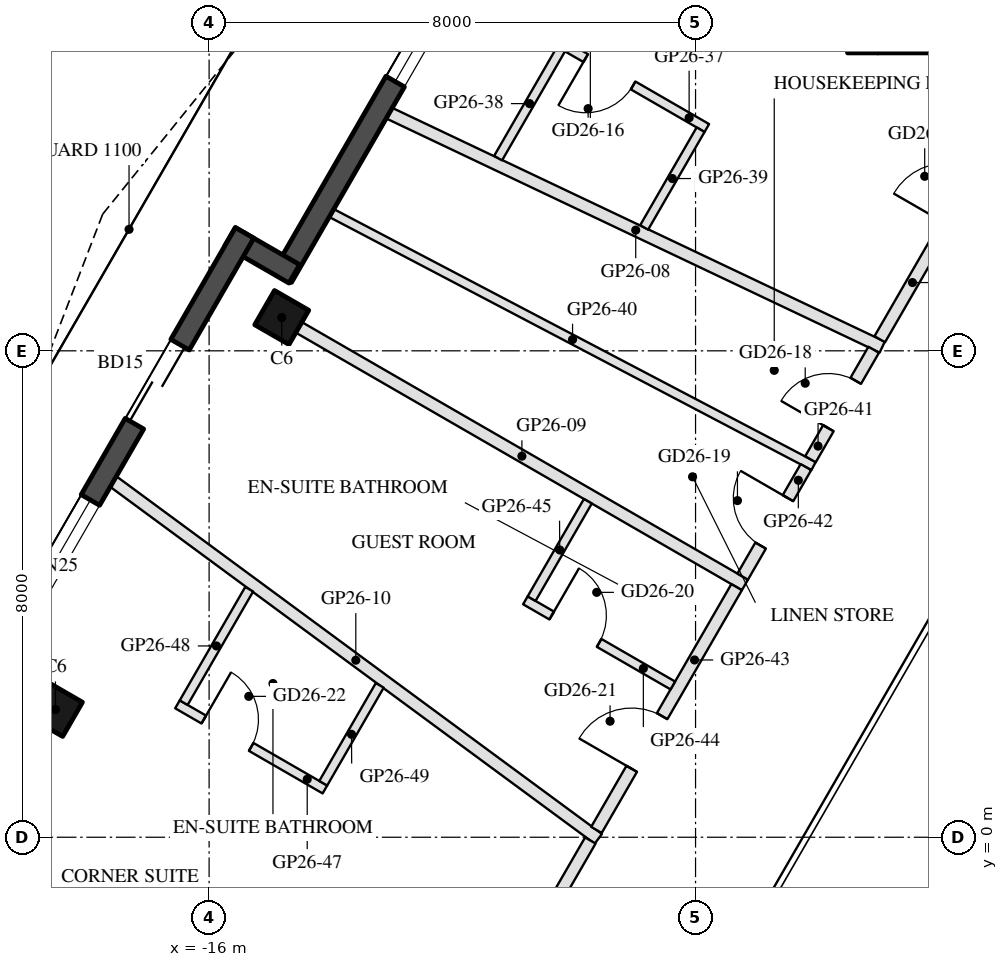
"""IFC4 building model, lengths in metres.
Left out: names, types, materials, properties, quantities, classifications, styles, units other than length and angle.
Written with IfcOpenShell. Run it as: python <this file> out.ifc"""

import sys

from ifc_helpers import new_model, si_unit, direction, frame, frame_2d, origin, origin_2d, place, context, subcontext, project, spatial, rectangle, hollow_rectangle, extrude, boolean, halfspace, element, fill, save


model = new_model("IFC4")
c1 = context("Model", 3, precision=1e-05, world=origin(), true_north=direction((0.0, 1.0)))
c2 = subcontext(c1, "Body", "Model", "MODEL_VIEW")
j1 = project(units=[si_unit("LENGTHUNIT", "METRE"), si_unit("PLANEANGLEUNIT", "RADIAN")], contexts=[c1])
p1 = place(None, origin())
s1 = spatial("IfcSite", under=j1, at=p1, CompositionType="ELEMENT")
p2 = place(p1, origin())
s2 = spatial("IfcBuilding", under=s1, at=p2, CompositionType="ELEMENT")
p3 = place(p2, frame((0.0, 0.0, 272.6)))
s3 = spatial("IfcBuildingStorey", under=s2, at=p3, CompositionType="ELEMENT", Elevation=272.6)
p4 = place(p3, frame((-14.805, 8.548, 0.0), z_axis=(0.0, 0.0, 1.0), x_axis=(0.5, 0.866025403784, 0.0)))
e1 = element("IfcColumn", 1, at=p4, inside=s3, PredefinedType="COLUMN", context=c2, shape_type="SweptSolid", body=[
    boolean("DIFFERENCE", extrude(hollow_rectangle(XDim=0.65, YDim=0.65, WallThickness=0.03, at=origin_2d()), origin(), (0.0, 0.0, 1.0), 3.7), halfspace(frame((0.0, 0.0, 3.663), z_axis=(0.0, 0.0, 1.0), x_axis=(1.0, 0.0, 0.0)), False)),
])
p5 = place(p3, frame((-18.527, 2.102, 0.0), z_axis=(0.0, 0.0, 1.0), x_axis=(0.5, 0.866025403784, 0.0)))
e2 = element("IfcColumn", 2, at=p5, inside=s3, PredefinedType="COLUMN", context=c2, shape_type="SweptSolid", body=[
    boolean("DIFFERENCE", extrude(hollow_rectangle(XDim=0.65, YDim=0.65, WallThickness=0.03, at=origin_2d()), origin(), (0.0, 0.0, 1.0), 3.7), halfspace(frame((0.0, 0.0, 3.66), z_axis=(0.0, 0.0, 1.0), x_axis=(1.0, 0.0, 0.0)), False)),
])
p6 = place(p3, frame((-11.655, 14.655, 0.0), z_axis=(0.0, 0.0, 1.0), x_axis=(-0.499995993298, -0.866027717042, 0.0)))
e3 = element("IfcWall", 3, at=p6, inside=s3, PredefinedType="SOLIDWALL", context=c2, shape_type="SweptSolid", body=[
    extrude(rectangle(XDim=6.284, YDim=0.35, at=frame_2d((3.142, 0.0))), origin(), (0.0, 0.0, 1.0), 3.55),
])
p7 = place(p6, frame((0.77, 0.0, 0.3)))
e4 = element("IfcOpeningElement", 4, at=p7, cuts=e3, PredefinedType="OPENING", context=c2, shape_type="SweptSolid", body=[
    extrude(rectangle(XDim=1.8, YDim=2.65, at=frame_2d((0.9, 1.325))), frame((0.0, 0.185, 0.0), z_axis=(0.0, -1.0, 0.0), x_axis=(1.0, 0.0, 0.0)), (0.0, 0.0, 1.0), 0.37),
])
p8 = place(p3, frame((-14.599, 9.266, 0.0), z_axis=(0.0, 0.0, 1.0), x_axis=(-0.866005645448, 0.500034220881, 0.0)))
e5 = element("IfcWall", 5, at=p8, inside=s3, PredefinedType="SOLIDWALL", context=c2, shape_type="SweptSolid", body=[
    extrude(rectangle(XDim=1.22, YDim=0.35, at=frame_2d((0.61, 0.0))), origin(), (0.0, 0.0, 1.0), 3.55),
])
p9 = place(p3, frame((-15.416, 9.94, 0.0), z_axis=(0.0, 0.0, 1.0), x_axis=(-0.500005190411, -0.866022407078, 0.0)))
e6 = element("IfcWall", 6, at=p9, inside=s3, PredefinedType="SOLIDWALL", context=c2, shape_type="SweptSolid", body=[
    extrude(rectangle(XDim=9.244, YDim=0.35, at=frame_2d((4.622, 0.0))), origin(), (0.0, 0.0, 1.0), 3.55),
])
p10 = place(p9, frame((2.124, 0.0, 0.0)))
e7 = element("IfcOpeningElement", 7, at=p10, cuts=e6, PredefinedType="OPENING", context=c2, shape_type="SweptSolid", body=[
    extrude(rectangle(XDim=1.5, YDim=2.4, at=frame_2d((0.75, 1.2))), frame((0.0, 0.185, 0.0), z_axis=(0.0, -1.0, 0.0), x_axis=(1.0, 0.0, 0.0)), (0.0, 0.0, 1.0), 0.37),
])
p11 = place(p9, frame((5.072, 0.0, 0.3)))
e8 = element("IfcOpeningElement", 8, at=p11, cuts=e6, PredefinedType="OPENING", context=c2, shape_type="SweptSolid", body=[
    extrude(rectangle(XDim=2.5, YDim=2.65, at=frame_2d((1.25, 1.325))), frame((0.0, 0.185, 0.0), z_axis=(0.0, -1.0, 0.0), x_axis=(1.0, 0.0, 0.0)), (0.0, 0.0, 1.0), 0.37),
])
p12 = place(p3, frame((-5.25, 12.9, 0.0), z_axis=(0.0, 0.0, 1.0), x_axis=(0.0, 1.0, 0.0)))
e9 = element("IfcWall", 9, at=p12, inside=s3, PredefinedType="SHEAR", context=c2, shape_type="SweptSolid", body=[
    extrude(rectangle(XDim=13.031, YDim=0.5, at=frame_2d((6.516, 0.0))), origin(), (0.0, 0.0, 1.0), 3.5),
])
p13 = place(p3, frame((5.0, 13.1, 0.0), z_axis=(0.0, 0.0, 1.0), x_axis=(-1.0, 0.0, 0.0)))
e10 = element("IfcWall", 10, at=p13, inside=s3, PredefinedType="SHEAR", context=c2, shape_type="SweptSolid", body=[
    extrude(rectangle(XDim=10.0, YDim=0.4, at=frame_2d((5.0, 0.0))), origin(), (0.0, 0.0, 1.0), 3.5),
])
p14 = place(p13, frame((3.55, 0.0, 0.0)))
e11 = element("IfcOpeningElement", 11, at=p14, cuts=e10, PredefinedType="OPENING", context=c2, shape_type="SweptSolid", body=[
    extrude(rectangle(XDim=1.1, YDim=2.1, at=frame_2d((0.55, 1.05))), frame((0.0, 0.21, 0.0), z_axis=(0.0, -1.0, 0.0), x_axis=(1.0, 0.0, 0.0)), (0.0, 0.0, 1.0), 0.42),
])
p15 = place(p13, frame((5.85, 0.0, 0.0)))
e12 = element("IfcOpeningElement", 12, at=p15, cuts=e10, PredefinedType="OPENING", context=c2, shape_type="SweptSolid", body=[
    extrude(rectangle(XDim=1.4, YDim=2.1, at=frame_2d((0.7, 1.05))), frame((0.0, 0.21, 0.0), z_axis=(0.0, -1.0, 0.0), x_axis=(1.0, 0.0, 0.0)), (0.0, 0.0, 1.0), 0.42),
])
p16 = place(p3, frame((-13.038, 11.909, 0.0), z_axis=(0.0, 0.0, 1.0), x_axis=(0.903427417518, -0.428741065536, 0.0)))
e13 = element("IfcWall", 13, at=p16, inside=s3, PredefinedType="PARTITIONING", context=c2, shape_type="SweptSolid", body=[
    extrude(rectangle(XDim=8.975, YDim=0.2, at=frame_2d((4.487, 0.0))), origin(), (0.0, 0.0, 1.0), 3.0),
])
p17 = place(p3, frame((-14.524, 8.385, 0.0), z_axis=(0.0, 0.0, 1.0), x_axis=(0.866015680395, -0.500016841027, 0.0)))
e14 = element("IfcWall", 14, at=p17, inside=s3, PredefinedType="PARTITIONING", context=c2, shape_type="SweptSolid", body=[
    extrude(rectangle(XDim=8.471, YDim=0.2, at=frame_2d((4.235, 0.0))), origin(), (0.0, 0.0, 1.0), 3.0),
])
p18 = place(p3, frame((-17.576, 5.85, 0.0), z_axis=(0.0, 0.0, 1.0), x_axis=(0.805127680306, -0.593101524535, 0.0)))
e15 = element("IfcWall", 15, at=p18, inside=s3, PredefinedType="PARTITIONING", context=c2, shape_type="SweptSolid", body=[
    extrude(rectangle(XDim=9.907, YDim=0.2, at=frame_2d((4.954, 0.0))), origin(), (0.0, 0.0, 1.0), 3.0),
])
p19 = place(p3, frame((-4.97, 8.191, 0.0), z_axis=(0.0, 0.0, 1.0), x_axis=(0.499994808408, 0.866028401131, 0.0)))
e16 = element("IfcWall", 16, at=p19, inside=s3, PredefinedType="PARTITIONING", context=c2, shape_type="SweptSolid", body=[
    extrude(rectangle(XDim=5.38, YDim=0.2, at=frame_2d((2.69, 0.0))), origin(), (0.0, 0.0, 1.0), 3.0),
])
p20 = place(p19, frame((2.19, 0.0, 0.0)))
e17 = element("IfcOpeningElement", 17, at=p20, cuts=e16, PredefinedType="OPENING", context=c2, shape_type="SweptSolid", body=[
    extrude(rectangle(XDim=1.0, YDim=2.1, at=frame_2d((0.5, 1.05))), frame((0.0, 0.11, 0.0), z_axis=(0.0, -1.0, 0.0), x_axis=(1.0, 0.0, 0.0)), (0.0, 0.0, 1.0), 0.22),
])
p21 = place(p3, frame((-7.815, 11.665, 0.0), z_axis=(0.0, 0.0, 1.0), x_axis=(-0.865996816683, 0.500049511043, 0.0)))
e18 = element("IfcWall", 18, at=p21, inside=s3, PredefinedType="PARTITIONING", context=c2, shape_type="SweptSolid", body=[
    extrude(rectangle(XDim=2.8, YDim=0.15, at=frame_2d((1.4, 0.0))), origin(), (0.0, 0.0, 1.0), 3.55),
])
p22 = place(p21, frame((1.4, 0.0, 0.0)))
e19 = element("IfcOpeningElement", 19, at=p22, cuts=e18, PredefinedType="OPENING", context=c2, shape_type="SweptSolid", body=[
    extrude(rectangle(XDim=0.9, YDim=2.1, at=frame_2d((0.45, 1.05))), frame((0.0, 0.085, 0.0), z_axis=(0.0, -1.0, 0.0), x_axis=(1.0, 0.0, 0.0)), (0.0, 0.0, 1.0), 0.17),
])
p23 = place(p3, frame((-10.212, 12.962, 0.0), z_axis=(0.0, 0.0, 1.0), x_axis=(-0.500008344384, -0.866020586098, 0.0)))
e20 = element("IfcWall", 20, at=p23, inside=s3, PredefinedType="PARTITIONING", context=c2, shape_type="SweptSolid", body=[
    extrude(rectangle(XDim=2.07, YDim=0.15, at=frame_2d((1.035, 0.0))), origin(), (0.0, 0.0, 1.0), 3.55),
])
p24 = place(p3, frame((-7.917, 11.637, 0.0), z_axis=(0.0, 0.0, 1.0), x_axis=(-0.500071598593, -0.865984062371, 0.0)))
e21 = element("IfcWall", 21, at=p24, inside=s3, PredefinedType="PARTITIONING", context=c2, shape_type="SweptSolid", body=[
    extrude(rectangle(XDim=1.856, YDim=0.15, at=frame_2d((0.928, 0.0))), origin(), (0.0, 0.0, 1.0), 3.55),
])
p25 = place(p3, frame((-13.987, 10.266, 0.0), z_axis=(0.0, 0.0, 1.0), x_axis=(0.885474206285, -0.464688530097, 0.0)))
e22 = element("IfcWall", 22, at=p25, inside=s3, PredefinedType="PARTITIONING", context=c2, shape_type="SweptSolid", body=[
    extrude(rectangle(XDim=8.953, YDim=0.15, at=frame_2d((4.477, 0.0))), origin(), (0.0, 0.0, 1.0), 3.1),
])
p26 = place(p3, frame((-6.11, 6.217, 0.0), z_axis=(0.0, 0.0, 1.0), x_axis=(0.500017307165, 0.866015411258, 0.0)))
e23 = element("IfcWall", 23, at=p26, inside=s3, PredefinedType="PARTITIONING", context=c2, shape_type="SweptSolid", body=[
    extrude(rectangle(XDim=2.079, YDim=0.2, at=frame_2d((1.039, 0.0))), origin(), (0.0, 0.0, 1.0), 3.0),
])
p27 = place(p26, frame((0.589, 0.0, 0.0)))
e24 = element("IfcOpeningElement", 24, at=p27, cuts=e23, PredefinedType="OPENING", context=c2, shape_type="SweptSolid", body=[
    extrude(rectangle(XDim=0.9, YDim=2.1, at=frame_2d((0.45, 1.05))), frame((0.0, 0.11, 0.0), z_axis=(0.0, -1.0, 0.0), x_axis=(1.0, 0.0, 0.0)), (0.0, 0.0, 1.0), 0.22),
])
p28 = place(p3, frame((-7.225, 4.287, 0.0), z_axis=(0.0, 0.0, 1.0), x_axis=(0.500003678222, 0.866023280152, 0.0)))
e25 = element("IfcWall", 25, at=p28, inside=s3, PredefinedType="PARTITIONING", context=c2, shape_type="SweptSolid", body=[
    extrude(rectangle(XDim=2.079, YDim=0.2, at=frame_2d((1.04, 0.0))), origin(), (0.0, 0.0, 1.0), 3.0),
])
p29 = place(p28, frame((0.59, 0.0, 0.0)))
e26 = element("IfcOpeningElement", 26, at=p29, cuts=e25, PredefinedType="OPENING", context=c2, shape_type="SweptSolid", body=[
    extrude(rectangle(XDim=0.9, YDim=2.1, at=frame_2d((0.45, 1.05))), frame((0.0, 0.11, 0.0), z_axis=(0.0, -1.0, 0.0), x_axis=(1.0, 0.0, 0.0)), (0.0, 0.0, 1.0), 0.22),
])
p30 = place(p3, frame((-9.63, 0.121, 0.0), z_axis=(0.0, 0.0, 1.0), x_axis=(0.500000544019, 0.866025089694, 0.0)))
e27 = element("IfcWall", 27, at=p30, inside=s3, PredefinedType="PARTITIONING", context=c2, shape_type="SweptSolid", body=[
    extrude(rectangle(XDim=4.61, YDim=0.2, at=frame_2d((2.305, 0.0))), origin(), (0.0, 0.0, 1.0), 3.0),
])
p31 = place(p30, frame((1.161, 0.0, 0.0)))
e28 = element("IfcOpeningElement", 28, at=p31, cuts=e27, PredefinedType="OPENING", context=c2, shape_type="SweptSolid", body=[
    extrude(rectangle(XDim=1.0, YDim=2.1, at=frame_2d((0.5, 1.05))), frame((0.0, 0.11, 0.0), z_axis=(0.0, -1.0, 0.0), x_axis=(1.0, 0.0, 0.0)), (0.0, 0.0, 1.0), 0.22),
])
p32 = place(p3, frame((-10.799, 3.896, 0.0), z_axis=(0.0, 0.0, 1.0), x_axis=(0.866034573852, -0.49998411664, 0.0)))
e29 = element("IfcWall", 29, at=p32, inside=s3, PredefinedType="PARTITIONING", context=c2, shape_type="SweptSolid", body=[
    extrude(rectangle(XDim=2.8, YDim=0.15, at=frame_2d((1.4, 0.0))), origin(), (0.0, 0.0, 1.0), 3.55),
])
p33 = place(p32, frame((0.5, 0.0, 0.0)))
e30 = element("IfcOpeningElement", 30, at=p33, cuts=e29, PredefinedType="OPENING", context=c2, shape_type="SweptSolid", body=[
    extrude(rectangle(XDim=0.9, YDim=2.1, at=frame_2d((0.45, 1.05))), frame((0.0, 0.085, 0.0), z_axis=(0.0, -1.0, 0.0), x_axis=(1.0, 0.0, 0.0)), (0.0, 0.0, 1.0), 0.17),
])
p34 = place(p3, frame((-9.771, 5.526, 0.0), z_axis=(0.0, 0.0, 1.0), x_axis=(-0.500042316284, -0.866000971088, 0.0)))
e31 = element("IfcWall", 31, at=p34, inside=s3, PredefinedType="PARTITIONING", context=c2, shape_type="SweptSolid", body=[
    extrude(rectangle(XDim=1.85, YDim=0.15, at=frame_2d((0.925, 0.0))), origin(), (0.0, 0.0, 1.0), 3.0),
])
p35 = place(p3, frame((-12.269, -4.45, 0.0), z_axis=(0.0, 0.0, 1.0), x_axis=(0.500023578739, 0.866011790165, 0.0)))
e32 = element("IfcWall", 32, at=p35, inside=s3, PredefinedType="PARTITIONING", context=c2, shape_type="SweptSolid", body=[
    extrude(rectangle(XDim=5.076, YDim=0.2, at=frame_2d((2.538, 0.0))), origin(), (0.0, 0.0, 1.0), 3.0),
])
p36 = place(p35, frame((2.038, 0.0, 0.0)))
e33 = element("IfcOpeningElement", 33, at=p36, cuts=e32, PredefinedType="OPENING", context=c2, shape_type="SweptSolid", body=[
    extrude(rectangle(XDim=1.0, YDim=2.1, at=frame_2d((0.5, 1.05))), frame((0.0, 0.11, 0.0), z_axis=(0.0, -1.0, 0.0), x_axis=(1.0, 0.0, 0.0)), (0.0, 0.0, 1.0), 0.22),
])
p37 = place(p3, frame((-16.521, 2.186, 0.0), z_axis=(0.0, 0.0, 1.0), x_axis=(0.865996816683, -0.500049511043, 0.0)))
e34 = element("IfcWall", 34, at=p37, inside=s3, PredefinedType="PARTITIONING", context=c2, shape_type="SweptSolid", body=[
    extrude(rectangle(XDim=2.8, YDim=0.15, at=frame_2d((1.4, 0.0))), origin(), (0.0, 0.0, 1.0), 3.55),
])
p38 = place(p37, frame((0.5, 0.0, 0.0)))
e35 = element("IfcOpeningElement", 35, at=p38, cuts=e34, PredefinedType="OPENING", context=c2, shape_type="SweptSolid", body=[
    extrude(rectangle(XDim=0.9, YDim=2.1, at=frame_2d((0.45, 1.05))), frame((0.0, 0.085, 0.0), z_axis=(0.0, -1.0, 0.0), x_axis=(1.0, 0.0, 0.0)), (0.0, 0.0, 1.0), 0.17),
])
p39 = place(p3, frame((-15.341, 4.079, 0.0), z_axis=(0.0, 0.0, 1.0), x_axis=(-0.499941519689, -0.866059164775, 0.0)))
e36 = element("IfcWall", 36, at=p39, inside=s3, PredefinedType="PARTITIONING", context=c2, shape_type="SweptSolid", body=[
    extrude(rectangle(XDim=2.155, YDim=0.15, at=frame_2d((1.077, 0.0))), origin(), (0.0, 0.0, 1.0), 3.55),
])
p40 = place(p3, frame((-13.194, 2.498, 0.0), z_axis=(0.0, 0.0, 1.0), x_axis=(-0.500010545262, -0.866019315389, 0.0)))
e37 = element("IfcWall", 37, at=p40, inside=s3, PredefinedType="PARTITIONING", context=c2, shape_type="SweptSolid", body=[
    extrude(rectangle(XDim=1.858, YDim=0.15, at=frame_2d((0.929, 0.0))), origin(), (0.0, 0.0, 1.0), 3.55),
])
p41 = place(p7, origin())
e38 = element("IfcWindow", 38, at=p41, inside=s3, PartitioningType="SINGLE_PANEL", PredefinedType="WINDOW", context=c2, shape_type="SweptSolid", body=[
    extrude(rectangle(XDim=1.8, YDim=2.65, at=frame_2d((0.9, 1.325))), frame((0.0, 0.03, 0.0), z_axis=(0.0, -1.0, 0.0), x_axis=(1.0, 0.0, 0.0)), (0.0, 0.0, 1.0), 0.06),
])
fill(e4, e38)
p42 = place(p10, frame((1.5, 0.0, 0.0), z_axis=(0.0, 0.0, 1.0), x_axis=(-1.0, 0.0, 0.0)))
e39 = element("IfcDoor", 39, at=p42, inside=s3, OperationType="SLIDING_TO_LEFT", PredefinedType="DOOR", context=c2, shape_type="SweptSolid", body=[
    extrude(rectangle(XDim=1.5, YDim=2.4, at=frame_2d((0.75, 1.2))), frame((0.0, 0.025, 0.0), z_axis=(0.0, -1.0, 0.0), x_axis=(1.0, 0.0, 0.0)), (0.0, 0.0, 1.0), 0.05),
])
fill(e7, e39)
p43 = place(p11, origin())
e40 = element("IfcWindow", 40, at=p43, inside=s3, PartitioningType="SINGLE_PANEL", PredefinedType="WINDOW", context=c2, shape_type="SweptSolid", body=[
    extrude(rectangle(XDim=2.5, YDim=2.65, at=frame_2d((1.25, 1.325))), frame((0.0, 0.03, 0.0), z_axis=(0.0, -1.0, 0.0), x_axis=(1.0, 0.0, 0.0)), (0.0, 0.0, 1.0), 0.06),
])
fill(e8, e40)
p44 = place(p22, origin())
e41 = element("IfcDoor", 41, at=p44, inside=s3, OperationType="SINGLE_SWING_RIGHT", PredefinedType="DOOR", context=c2, shape_type="SweptSolid", body=[
    extrude(rectangle(XDim=0.9, YDim=2.1, at=frame_2d((0.45, 1.05))), frame((0.0, 0.025, 0.0), z_axis=(0.0, -1.0, 0.0), x_axis=(1.0, 0.0, 0.0)), (0.0, 0.0, 1.0), 0.05),
])
fill(e19, e41)
p45 = place(p27, origin())
e42 = element("IfcDoor", 42, at=p45, inside=s3, OperationType="SINGLE_SWING_LEFT", PredefinedType="DOOR", context=c2, shape_type="SweptSolid", body=[
    extrude(rectangle(XDim=0.9, YDim=2.1, at=frame_2d((0.45, 1.05))), frame((0.0, 0.025, 0.0), z_axis=(0.0, -1.0, 0.0), x_axis=(1.0, 0.0, 0.0)), (0.0, 0.0, 1.0), 0.05),
])
fill(e24, e42)
p46 = place(p29, origin())
e43 = element("IfcDoor", 43, at=p46, inside=s3, OperationType="SINGLE_SWING_RIGHT", PredefinedType="DOOR", context=c2, shape_type="SweptSolid", body=[
    extrude(rectangle(XDim=0.9, YDim=2.1, at=frame_2d((0.45, 1.05))), frame((0.0, 0.025, 0.0), z_axis=(0.0, -1.0, 0.0), x_axis=(1.0, 0.0, 0.0)), (0.0, 0.0, 1.0), 0.05),
])
fill(e26, e43)
p47 = place(p33, origin())
e44 = element("IfcDoor", 44, at=p47, inside=s3, OperationType="SINGLE_SWING_LEFT", PredefinedType="DOOR", context=c2, shape_type="SweptSolid", body=[
    extrude(rectangle(XDim=0.9, YDim=2.1, at=frame_2d((0.45, 1.05))), frame((0.0, 0.025, 0.0), z_axis=(0.0, -1.0, 0.0), x_axis=(1.0, 0.0, 0.0)), (0.0, 0.0, 1.0), 0.05),
])
fill(e30, e44)
p48 = place(p31, origin())
e45 = element("IfcDoor", 45, at=p48, inside=s3, OperationType="SINGLE_SWING_LEFT", PredefinedType="DOOR", context=c2, shape_type="SweptSolid", body=[
    extrude(rectangle(XDim=1.0, YDim=2.1, at=frame_2d((0.5, 1.05))), frame((0.0, 0.025, 0.0), z_axis=(0.0, -1.0, 0.0), x_axis=(1.0, 0.0, 0.0)), (0.0, 0.0, 1.0), 0.05),
])
fill(e28, e45)
p49 = place(p38, origin())
e46 = element("IfcDoor", 46, at=p49, inside=s3, OperationType="SINGLE_SWING_LEFT", PredefinedType="DOOR", context=c2, shape_type="SweptSolid", body=[
    extrude(rectangle(XDim=0.9, YDim=2.1, at=frame_2d((0.45, 1.05))), frame((0.0, 0.025, 0.0), z_axis=(0.0, -1.0, 0.0), x_axis=(1.0, 0.0, 0.0)), (0.0, 0.0, 1.0), 0.05),
])
fill(e35, e46)
save(model, sys.argv[1])
